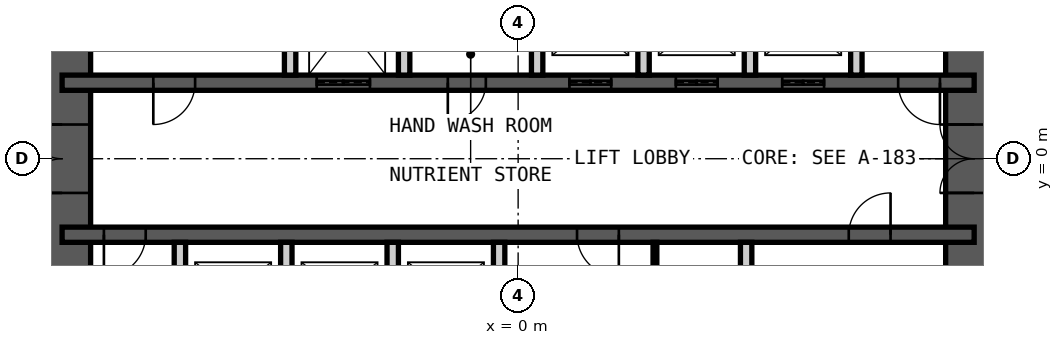
"""IFC4 building model, lengths in metres.
Left out: names, types, materials, properties, quantities, classifications, styles, units other than length and angle.
Written with IfcOpenShell. Run it as: python <this file> out.ifc"""

import sys

from ifc_helpers import new_model, si_unit, direction, frame, frame_2d, origin, place, context, subcontext, project, spatial, rectangle, extrude, element, fill, save


model = new_model("IFC4")
c1 = context("Model", 3, precision=1e-05, world=origin(), true_north=direction((0.0, 1.0)))
c2 = subcontext(c1, "Body", "Model", "MODEL_VIEW")
j1 = project(units=[si_unit("LENGTHUNIT", "METRE"), si_unit("PLANEANGLEUNIT", "RADIAN")], contexts=[c1])
p1 = place(None, origin())
s1 = spatial("IfcSite", under=j1, at=p1, CompositionType="ELEMENT")
p2 = place(p1, origin())
s2 = spatial("IfcBuilding", under=s1, at=p2, CompositionType="ELEMENT")
p3 = place(p2, frame((0.0, 0.0, 47.0)))
s3 = spatial("IfcBuildingStorey", under=s2, at=p3, CompositionType="ELEMENT", Elevation=47.0)
p4 = place(p3, frame((12.0, -9.0, 0.0), z_axis=(0.0, 0.0, 1.0), x_axis=(0.0, 1.0, 0.0)))
e1 = element("IfcWall", 1, at=p4, inside=s3, PredefinedType="SHEAR", context=c2, shape_type="SweptSolid", body=[
    extrude(rectangle(XDim=18.0, YDim=1.5, at=frame_2d((9.0, 0.0))), origin(), (0.0, 0.0, 1.0), 5.0),
])
p5 = place(p4, frame((8.1, 0.0, 0.0)))
e2 = element("IfcOpeningElement", 2, at=p5, cuts=e1, PredefinedType="OPENING", context=c2, shape_type="SweptSolid", body=[
    extrude(rectangle(XDim=1.8, YDim=2.1, at=frame_2d((0.9, 1.05))), frame((0.0, 0.76, 0.0), z_axis=(0.0, -1.0, 0.0), x_axis=(1.0, 0.0, 0.0)), (0.0, 0.0, 1.0), 1.52),
])
p6 = place(p3, frame((-12.0, -9.0, 0.0), z_axis=(0.0, 0.0, 1.0), x_axis=(0.0, 1.0, 0.0)))
e3 = element("IfcWall", 3, at=p6, inside=s3, PredefinedType="SHEAR", context=c2, shape_type="SweptSolid", body=[
    extrude(rectangle(XDim=18.0, YDim=1.5, at=frame_2d((9.0, 0.0))), origin(), (0.0, 0.0, 1.0), 5.0),
])
p7 = place(p6, frame((8.1, 0.0, 0.0)))
e4 = element("IfcOpeningElement", 4, at=p7, cuts=e3, PredefinedType="OPENING", context=c2, shape_type="SweptSolid", body=[
    extrude(rectangle(XDim=1.8, YDim=2.1, at=frame_2d((0.9, 1.05))), frame((0.0, 0.76, 0.0), z_axis=(0.0, -1.0, 0.0), x_axis=(1.0, 0.0, 0.0)), (0.0, 0.0, 1.0), 1.52),
])
p8 = place(p3, frame((-12.0, 2.0, 0.0), z_axis=(0.0, 0.0, 1.0), x_axis=(1.0, 0.0, 0.0)))
e5 = element("IfcWall", 5, at=p8, inside=s3, PredefinedType="SHEAR", context=c2, shape_type="SweptSolid", body=[
    extrude(rectangle(XDim=24.0, YDim=0.4, at=frame_2d((12.0, 0.0))), origin(), (0.0, 0.0, 1.0), 5.0),
])
p9 = place(p8, frame((2.4, 0.0, 0.0)))
e6 = element("IfcOpeningElement", 6, at=p9, cuts=e5, PredefinedType="OPENING", context=c2, shape_type="SweptSolid", body=[
    extrude(rectangle(XDim=1.1, YDim=2.1, at=frame_2d((0.55, 1.05))), frame((0.0, 0.21, 0.0), z_axis=(0.0, -1.0, 0.0), x_axis=(1.0, 0.0, 0.0)), (0.0, 0.0, 1.0), 0.42),
])
p10 = place(p8, frame((22.0, 0.0, 0.0)))
e7 = element("IfcOpeningElement", 7, at=p10, cuts=e5, PredefinedType="OPENING", context=c2, shape_type="SweptSolid", body=[
    extrude(rectangle(XDim=1.1, YDim=2.1, at=frame_2d((0.55, 1.05))), frame((0.0, 0.21, 0.0), z_axis=(0.0, -1.0, 0.0), x_axis=(1.0, 0.0, 0.0)), (0.0, 0.0, 1.0), 0.42),
])
p11 = place(p8, frame((10.15, 0.0, 0.0)))
e8 = element("IfcOpeningElement", 8, at=p11, cuts=e5, PredefinedType="OPENING", context=c2, shape_type="SweptSolid", body=[
    extrude(rectangle(XDim=1.0, YDim=2.1, at=frame_2d((0.5, 1.05))), frame((0.0, 0.21, 0.0), z_axis=(0.0, -1.0, 0.0), x_axis=(1.0, 0.0, 0.0)), (0.0, 0.0, 1.0), 0.42),
])
p12 = place(p8, frame((6.7, 0.0, 0.0)))
e9 = element("IfcOpeningElement", 9, at=p12, cuts=e5, PredefinedType="OPENING", context=c2, shape_type="SweptSolid", body=[
    extrude(rectangle(XDim=1.4, YDim=2.4, at=frame_2d((0.7, 1.2))), frame((0.0, 0.21, 0.0), z_axis=(0.0, -1.0, 0.0), x_axis=(1.0, 0.0, 0.0)), (0.0, 0.0, 1.0), 0.42),
])
p13 = place(p8, frame((13.35, 0.0, 0.0)))
e10 = element("IfcOpeningElement", 10, at=p13, cuts=e5, PredefinedType="OPENING", context=c2, shape_type="SweptSolid", body=[
    extrude(rectangle(XDim=1.1, YDim=2.4, at=frame_2d((0.55, 1.2))), frame((0.0, 0.21, 0.0), z_axis=(0.0, -1.0, 0.0), x_axis=(1.0, 0.0, 0.0)), (0.0, 0.0, 1.0), 0.42),
])
p14 = place(p8, frame((16.15, 0.0, 0.0)))
e11 = element("IfcOpeningElement", 11, at=p14, cuts=e5, PredefinedType="OPENING", context=c2, shape_type="SweptSolid", body=[
    extrude(rectangle(XDim=1.1, YDim=2.4, at=frame_2d((0.55, 1.2))), frame((0.0, 0.21, 0.0), z_axis=(0.0, -1.0, 0.0), x_axis=(1.0, 0.0, 0.0)), (0.0, 0.0, 1.0), 0.42),
])
p15 = place(p8, frame((18.95, 0.0, 0.0)))
e12 = element("IfcOpeningElement", 12, at=p15, cuts=e5, PredefinedType="OPENING", context=c2, shape_type="SweptSolid", body=[
    extrude(rectangle(XDim=1.1, YDim=2.4, at=frame_2d((0.55, 1.2))), frame((0.0, 0.21, 0.0), z_axis=(0.0, -1.0, 0.0), x_axis=(1.0, 0.0, 0.0)), (0.0, 0.0, 1.0), 0.42),
])
p16 = place(p3, frame((-12.0, -2.0, 0.0), z_axis=(0.0, 0.0, 1.0), x_axis=(1.0, 0.0, 0.0)))
e13 = element("IfcWall", 13, at=p16, inside=s3, PredefinedType="SHEAR", context=c2, shape_type="SweptSolid", body=[
    extrude(rectangle(XDim=24.0, YDim=0.4, at=frame_2d((12.0, 0.0))), origin(), (0.0, 0.0, 1.0), 5.0),
])
p17 = place(p16, frame((1.1, 0.0, 0.0)))
e14 = element("IfcOpeningElement", 14, at=p17, cuts=e13, PredefinedType="OPENING", context=c2, shape_type="SweptSolid", body=[
    extrude(rectangle(XDim=1.1, YDim=2.1, at=frame_2d((0.55, 1.05))), frame((0.0, 0.21, 0.0), z_axis=(0.0, -1.0, 0.0), x_axis=(1.0, 0.0, 0.0)), (0.0, 0.0, 1.0), 0.42),
])
p18 = place(p16, frame((13.55, 0.0, 0.0)))
e15 = element("IfcOpeningElement", 15, at=p18, cuts=e13, PredefinedType="OPENING", context=c2, shape_type="SweptSolid", body=[
    extrude(rectangle(XDim=1.1, YDim=2.1, at=frame_2d((0.55, 1.05))), frame((0.0, 0.21, 0.0), z_axis=(0.0, -1.0, 0.0), x_axis=(1.0, 0.0, 0.0)), (0.0, 0.0, 1.0), 0.42),
])
p19 = place(p16, frame((20.7, 0.0, 0.0)))
e16 = element("IfcOpeningElement", 16, at=p19, cuts=e13, PredefinedType="OPENING", context=c2, shape_type="SweptSolid", body=[
    extrude(rectangle(XDim=1.1, YDim=2.1, at=frame_2d((0.55, 1.05))), frame((0.0, 0.21, 0.0), z_axis=(0.0, -1.0, 0.0), x_axis=(1.0, 0.0, 0.0)), (0.0, 0.0, 1.0), 0.42),
])
for number, where, z_axis, x_axis in (
    (17, (-6.0, 2.2, 0.0), (0.0, 0.0, 1.0), (0.0, 1.0, 0.0)),
    (18, (-3.0, 2.2, 0.0), (0.0, 0.0, 1.0), (0.0, 1.0, 0.0)),
    (19, (0.5, 2.2, 0.0), (0.0, 0.0, 1.0), (0.0, 1.0, 0.0)),
    (20, (3.3, 2.2, 0.0), (0.0, 0.0, 1.0), (0.0, 1.0, 0.0)),
    (21, (6.1, 2.2, 0.0), (0.0, 0.0, 1.0), (0.0, 1.0, 0.0)),
    (22, (8.9, 2.2, 0.0), (0.0, 0.0, 1.0), (0.0, 1.0, 0.0)),
    (23, (-8.9, -4.85, 0.0), (0.0, 0.0, 1.0), (0.0, 1.0, 0.0)),
    (24, (-6.1, -4.85, 0.0), (0.0, 0.0, 1.0), (0.0, 1.0, 0.0)),
    (25, (-3.3, -4.85, 0.0), (0.0, 0.0, 1.0), (0.0, 1.0, 0.0)),
    (26, (-0.5, -4.85, 0.0), (0.0, 0.0, 1.0), (0.0, 1.0, 0.0)),
    (27, (6.0, -4.85, 0.0), (0.0, 0.0, 1.0), (0.0, 1.0, 0.0)),
):
    element("IfcWall", number, at=place(p3, frame(where, z_axis=z_axis, x_axis=x_axis)), inside=s3, PredefinedType="PARTITIONING", context=c2, shape_type="SweptSolid", body=[
        extrude(rectangle(XDim=2.65, YDim=0.3, at=frame_2d((1.325, 0.0))), origin(), (0.0, 0.0, 1.0), 4.78),
    ])
p20 = place(p3, frame((3.6, -4.85, 0.0), z_axis=(0.0, 0.0, 1.0), x_axis=(0.0, 1.0, 0.0)))
e28 = element("IfcWall", 28, at=p20, inside=s3, PredefinedType="PARTITIONING", context=c2, shape_type="SweptSolid", body=[
    extrude(rectangle(XDim=2.65, YDim=0.1, at=frame_2d((1.325, 0.0))), origin(), (0.0, 0.0, 1.0), 4.78),
])
p21 = place(p20, frame((0.1, 0.0, 0.0)))
e29 = element("IfcOpeningElement", 29, at=p21, cuts=e28, PredefinedType="OPENING", context=c2, shape_type="SweptSolid", body=[
    extrude(rectangle(XDim=1.0, YDim=2.4, at=frame_2d((0.5, 1.2))), frame((0.0, 0.06, 0.0), z_axis=(0.0, -1.0, 0.0), x_axis=(1.0, 0.0, 0.0)), (0.0, 0.0, 1.0), 0.12),
])
p22 = place(p9, origin())
e30 = element("IfcDoor", 30, at=p22, inside=s3, OperationType="SINGLE_SWING_LEFT", PredefinedType="DOOR", context=c2, shape_type="SweptSolid", body=[
    extrude(rectangle(XDim=1.1, YDim=2.1, at=frame_2d((0.55, 1.05))), frame((0.0, 0.025, 0.0), z_axis=(0.0, -1.0, 0.0), x_axis=(1.0, 0.0, 0.0)), (0.0, 0.0, 1.0), 0.05),
])
fill(e6, e30)
p23 = place(p17, origin())
e31 = element("IfcDoor", 31, at=p23, inside=s3, OperationType="SINGLE_SWING_LEFT", PredefinedType="DOOR", context=c2, shape_type="SweptSolid", body=[
    extrude(rectangle(XDim=1.1, YDim=2.1, at=frame_2d((0.55, 1.05))), frame((0.0, 0.025, 0.0), z_axis=(0.0, -1.0, 0.0), x_axis=(1.0, 0.0, 0.0)), (0.0, 0.0, 1.0), 0.05),
])
fill(e14, e31)
p24 = place(p10, origin())
e32 = element("IfcDoor", 32, at=p24, inside=s3, OperationType="SINGLE_SWING_RIGHT", PredefinedType="DOOR", context=c2, shape_type="SweptSolid", body=[
    extrude(rectangle(XDim=1.1, YDim=2.1, at=frame_2d((0.55, 1.05))), frame((0.0, 0.025, 0.0), z_axis=(0.0, -1.0, 0.0), x_axis=(1.0, 0.0, 0.0)), (0.0, 0.0, 1.0), 0.05),
])
fill(e7, e32)
p25 = place(p11, origin())
e33 = element("IfcDoor", 33, at=p25, inside=s3, OperationType="SINGLE_SWING_LEFT", PredefinedType="DOOR", context=c2, shape_type="SweptSolid", body=[
    extrude(rectangle(XDim=1.0, YDim=2.1, at=frame_2d((0.5, 1.05))), frame((0.0, 0.025, 0.0), z_axis=(0.0, -1.0, 0.0), x_axis=(1.0, 0.0, 0.0)), (0.0, 0.0, 1.0), 0.05),
])
fill(e8, e33)
p26 = place(p18, origin())
e34 = element("IfcDoor", 34, at=p26, inside=s3, OperationType="SINGLE_SWING_RIGHT", PredefinedType="DOOR", context=c2, shape_type="SweptSolid", body=[
    extrude(rectangle(XDim=1.1, YDim=2.1, at=frame_2d((0.55, 1.05))), frame((0.0, 0.025, 0.0), z_axis=(0.0, -1.0, 0.0), x_axis=(1.0, 0.0, 0.0)), (0.0, 0.0, 1.0), 0.05),
])
fill(e15, e34)
p27 = place(p19, origin())
e35 = element("IfcDoor", 35, at=p27, inside=s3, OperationType="SINGLE_SWING_LEFT", PredefinedType="DOOR", context=c2, shape_type="SweptSolid", body=[
    extrude(rectangle(XDim=1.1, YDim=2.1, at=frame_2d((0.55, 1.05))), frame((0.0, 0.025, 0.0), z_axis=(0.0, -1.0, 0.0), x_axis=(1.0, 0.0, 0.0)), (0.0, 0.0, 1.0), 0.05),
])
fill(e16, e35)
p28 = place(p5, origin())
e36 = element("IfcDoor", 36, at=p28, inside=s3, OperationType="DOUBLE_DOOR_DOUBLE_SWING", PredefinedType="DOOR", context=c2, shape_type="SweptSolid", body=[
    extrude(rectangle(XDim=1.8, YDim=2.1, at=frame_2d((0.9, 1.05))), frame((0.0, 0.025, 0.0), z_axis=(0.0, -1.0, 0.0), x_axis=(1.0, 0.0, 0.0)), (0.0, 0.0, 1.0), 0.05),
])
fill(e2, e36)
p29 = place(p7, origin())
e37 = element("IfcDoor", 37, at=p29, inside=s3, OperationType="DOUBLE_DOOR_DOUBLE_SWING", PredefinedType="DOOR", context=c2, shape_type="SweptSolid", body=[
    extrude(rectangle(XDim=1.8, YDim=2.1, at=frame_2d((0.9, 1.05))), frame((0.0, 0.025, 0.0), z_axis=(0.0, -1.0, 0.0), x_axis=(1.0, 0.0, 0.0)), (0.0, 0.0, 1.0), 0.05),
])
fill(e4, e37)
p30 = place(p12, origin())
e38 = element("IfcDoor", 38, at=p30, inside=s3, OperationType="DOUBLE_DOOR_SLIDING", PredefinedType="DOOR", context=c2, shape_type="SweptSolid", body=[
    extrude(rectangle(XDim=1.4, YDim=2.4, at=frame_2d((0.7, 1.2))), frame((0.0, 0.025, 0.0), z_axis=(0.0, -1.0, 0.0), x_axis=(1.0, 0.0, 0.0)), (0.0, 0.0, 1.0), 0.05),
])
fill(e9, e38)
p31 = place(p13, origin())
e39 = element("IfcDoor", 39, at=p31, inside=s3, OperationType="DOUBLE_DOOR_SLIDING", PredefinedType="DOOR", context=c2, shape_type="SweptSolid", body=[
    extrude(rectangle(XDim=1.1, YDim=2.4, at=frame_2d((0.55, 1.2))), frame((0.0, 0.025, 0.0), z_axis=(0.0, -1.0, 0.0), x_axis=(1.0, 0.0, 0.0)), (0.0, 0.0, 1.0), 0.05),
])
fill(e10, e39)
p32 = place(p14, origin())
e40 = element("IfcDoor", 40, at=p32, inside=s3, OperationType="DOUBLE_DOOR_SLIDING", PredefinedType="DOOR", context=c2, shape_type="SweptSolid", body=[
    extrude(rectangle(XDim=1.1, YDim=2.4, at=frame_2d((0.55, 1.2))), frame((0.0, 0.025, 0.0), z_axis=(0.0, -1.0, 0.0), x_axis=(1.0, 0.0, 0.0)), (0.0, 0.0, 1.0), 0.05),
])
fill(e11, e40)
p33 = place(p15, origin())
e41 = element("IfcDoor", 41, at=p33, inside=s3, OperationType="DOUBLE_DOOR_SLIDING", PredefinedType="DOOR", context=c2, shape_type="SweptSolid", body=[
    extrude(rectangle(XDim=1.1, YDim=2.4, at=frame_2d((0.55, 1.2))), frame((0.0, 0.025, 0.0), z_axis=(0.0, -1.0, 0.0), x_axis=(1.0, 0.0, 0.0)), (0.0, 0.0, 1.0), 0.05),
])
fill(e12, e41)
save(model, sys.argv[1])
